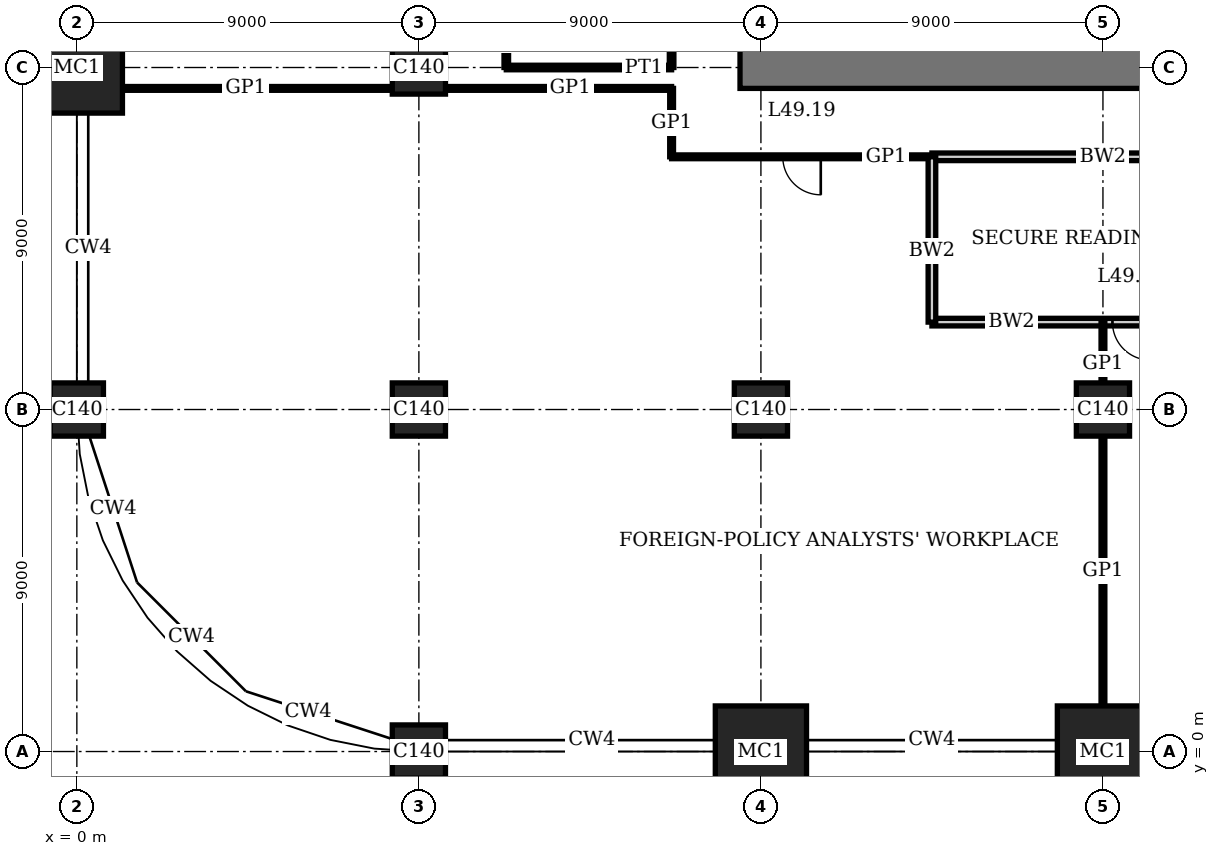
"""IFC4 building model, lengths in metres.
Left out: names, types, materials, properties, quantities, classifications, styles, units other than length and angle.
Written with IfcOpenShell. Run it as: python <this file> out.ifc"""

import sys

from ifc_helpers import new_model, si_unit, direction, frame, frame_2d, origin, origin_2d, place, context, subcontext, project, spatial, rectangle, extrude, element, fill, save


model = new_model("IFC4")
c1 = context("Model", 3, precision=1e-05, world=origin(), true_north=direction((0.0, 1.0)))
c2 = subcontext(c1, "Body", "Model", "MODEL_VIEW")
j1 = project(units=[si_unit("LENGTHUNIT", "METRE"), si_unit("PLANEANGLEUNIT", "RADIAN")], contexts=[c1])
p1 = place(None, origin())
s1 = spatial("IfcSite", under=j1, at=p1, CompositionType="ELEMENT")
p2 = place(p1, origin())
s2 = spatial("IfcBuilding", under=s1, at=p2, CompositionType="ELEMENT")
p3 = place(p2, frame((0.0, 0.0, 202.2)))
s3 = spatial("IfcBuildingStorey", under=s2, at=p3, CompositionType="ELEMENT", Elevation=202.2)
p4 = place(p3, frame((0.0, 9.0, 0.0), z_axis=(0.0, 0.0, 1.0), x_axis=(1.0, 0.0, 0.0)))
e1 = element("IfcColumn", 1, at=p4, inside=s3, PredefinedType="COLUMN", context=c2, shape_type="SweptSolid", body=[
    extrude(rectangle(XDim=1.4, YDim=1.4, at=origin_2d()), origin(), (0.0, 0.0, 1.0), 4.0),
])
p5 = place(p3, frame((0.0, 18.0, 0.0), z_axis=(0.0, 0.0, 1.0), x_axis=(1.0, 0.0, 0.0)))
e2 = element("IfcColumn", 2, at=p5, inside=s3, PredefinedType="COLUMN", context=c2, shape_type="SweptSolid", body=[
    extrude(rectangle(XDim=2.4, YDim=2.4, at=origin_2d()), origin(), (0.0, 0.0, 1.0), 4.0),
])
for number, where, z_axis, x_axis in (
    (3, (9.0, 0.0, 0.0), (0.0, 0.0, 1.0), (1.0, 0.0, 0.0)),
    (4, (9.0, 9.0, 0.0), (0.0, 0.0, 1.0), (1.0, 0.0, 0.0)),
    (5, (9.0, 18.0, 0.0), (0.0, 0.0, 1.0), (1.0, 0.0, 0.0)),
):
    element("IfcColumn", number, at=place(p3, frame(where, z_axis=z_axis, x_axis=x_axis)), inside=s3, PredefinedType="COLUMN", context=c2, shape_type="SweptSolid", body=[
        extrude(rectangle(XDim=1.4, YDim=1.4, at=origin_2d()), origin(), (0.0, 0.0, 1.0), 4.0),
    ])
p6 = place(p3, frame((18.0, 0.0, 0.0), z_axis=(0.0, 0.0, 1.0), x_axis=(1.0, 0.0, 0.0)))
e6 = element("IfcColumn", 6, at=p6, inside=s3, PredefinedType="COLUMN", context=c2, shape_type="SweptSolid", body=[
    extrude(rectangle(XDim=2.4, YDim=2.4, at=origin_2d()), origin(), (0.0, 0.0, 1.0), 4.0),
])
p7 = place(p3, frame((18.0, 9.0, 0.0), z_axis=(0.0, 0.0, 1.0), x_axis=(1.0, 0.0, 0.0)))
e7 = element("IfcColumn", 7, at=p7, inside=s3, PredefinedType="COLUMN", context=c2, shape_type="SweptSolid", body=[
    extrude(rectangle(XDim=1.4, YDim=1.4, at=origin_2d()), origin(), (0.0, 0.0, 1.0), 4.0),
])
p8 = place(p3, frame((27.0, 0.0, 0.0), z_axis=(0.0, 0.0, 1.0), x_axis=(1.0, 0.0, 0.0)))
e8 = element("IfcColumn", 8, at=p8, inside=s3, PredefinedType="COLUMN", context=c2, shape_type="SweptSolid", body=[
    extrude(rectangle(XDim=2.4, YDim=2.4, at=origin_2d()), origin(), (0.0, 0.0, 1.0), 4.0),
])
p9 = place(p3, frame((27.0, 9.0, 0.0), z_axis=(0.0, 0.0, 1.0), x_axis=(1.0, 0.0, 0.0)))
e9 = element("IfcColumn", 9, at=p9, inside=s3, PredefinedType="COLUMN", context=c2, shape_type="SweptSolid", body=[
    extrude(rectangle(XDim=1.4, YDim=1.4, at=origin_2d()), origin(), (0.0, 0.0, 1.0), 4.0),
])
p10 = place(p3, frame((17.45, 18.0, 0.0), z_axis=(0.0, 0.0, 1.0), x_axis=(1.0, 0.0, 0.0)))
e10 = element("IfcWall", 10, at=p10, inside=s3, PredefinedType="SHEAR", context=c2, shape_type="SweptSolid", body=[
    extrude(rectangle(XDim=28.1, YDim=1.1, at=frame_2d((14.05, 0.0))), origin(), (0.0, 0.0, 1.0), 4.0),
])
p11 = place(p10, frame((11.55, 0.0, 0.0)))
e11 = element("IfcOpeningElement", 11, at=p11, cuts=e10, PredefinedType="OPENING", context=c2, shape_type="SweptSolid", body=[
    extrude(rectangle(XDim=1.0, YDim=2.4, at=frame_2d((0.5, 1.2))), frame((0.0, 0.56, 0.0), z_axis=(0.0, -1.0, 0.0), x_axis=(1.0, 0.0, 0.0)), (0.0, 0.0, 1.0), 1.12),
])
p12 = place(p10, frame((16.55, 0.0, 0.0)))
e12 = element("IfcOpeningElement", 12, at=p12, cuts=e10, PredefinedType="OPENING", context=c2, shape_type="SweptSolid", body=[
    extrude(rectangle(XDim=1.0, YDim=2.4, at=frame_2d((0.5, 1.2))), frame((0.0, 0.56, 0.0), z_axis=(0.0, -1.0, 0.0), x_axis=(1.0, 0.0, 0.0)), (0.0, 0.0, 1.0), 1.12),
])
p13 = place(p10, frame((20.0, 0.0, 0.0)))
e13 = element("IfcOpeningElement", 13, at=p13, cuts=e10, PredefinedType="OPENING", context=c2, shape_type="SweptSolid", body=[
    extrude(rectangle(XDim=1.1, YDim=2.4, at=frame_2d((0.55, 1.2))), frame((0.0, 0.56, 0.0), z_axis=(0.0, -1.0, 0.0), x_axis=(1.0, 0.0, 0.0)), (0.0, 0.0, 1.0), 1.12),
])
p14 = place(p10, frame((24.05, 0.0, 0.0)))
e14 = element("IfcOpeningElement", 14, at=p14, cuts=e10, PredefinedType="OPENING", context=c2, shape_type="SweptSolid", body=[
    extrude(rectangle(XDim=1.0, YDim=2.4, at=frame_2d((0.5, 1.2))), frame((0.0, 0.56, 0.0), z_axis=(0.0, -1.0, 0.0), x_axis=(1.0, 0.0, 0.0)), (0.0, 0.0, 1.0), 1.12),
])
p15 = place(p3, frame((22.5, 11.3, 0.0), z_axis=(0.0, 0.0, 1.0), x_axis=(1.0, 0.0, 0.0)))
e15 = element("IfcWall", 15, at=p15, inside=s3, PredefinedType="SOLIDWALL", context=c2, shape_type="SweptSolid", body=[
    extrude(rectangle(XDim=9.0, YDim=0.2, at=frame_2d((4.5, 0.0))), origin(), (0.0, 0.0, 1.0), 3.75),
])
p16 = place(p15, frame((4.75, 0.0, 0.0)))
e16 = element("IfcOpeningElement", 16, at=p16, cuts=e15, PredefinedType="OPENING", context=c2, shape_type="SweptSolid", body=[
    extrude(rectangle(XDim=1.0, YDim=2.4, at=frame_2d((0.5, 1.2))), frame((0.0, 0.11, 0.0), z_axis=(0.0, -1.0, 0.0), x_axis=(1.0, 0.0, 0.0)), (0.0, 0.0, 1.0), 0.22),
])
p17 = place(p3, frame((22.5, 15.65, 0.0), z_axis=(0.0, 0.0, 1.0), x_axis=(1.0, 0.0, 0.0)))
e17 = element("IfcWall", 17, at=p17, inside=s3, PredefinedType="SOLIDWALL", context=c2, shape_type="SweptSolid", body=[
    extrude(rectangle(XDim=9.0, YDim=0.2, at=frame_2d((4.5, 0.0))), origin(), (0.0, 0.0, 1.0), 3.75),
])
p18 = place(p3, frame((15.65, 15.65, 0.0), z_axis=(0.0, 0.0, 1.0), x_axis=(1.0, 0.0, 0.0)))
e18 = element("IfcWall", 18, at=p18, inside=s3, PredefinedType="PARTITIONING", context=c2, shape_type="SweptSolid", body=[
    extrude(rectangle(XDim=6.85, YDim=0.1, at=frame_2d((3.425, 0.0))), origin(), (0.0, 0.0, 1.0), 3.75),
])
p19 = place(p18, frame((2.925, 0.0, 0.0)))
e19 = element("IfcOpeningElement", 19, at=p19, cuts=e18, PredefinedType="OPENING", context=c2, shape_type="SweptSolid", body=[
    extrude(rectangle(XDim=1.0, YDim=2.4, at=frame_2d((0.5, 1.2))), frame((0.0, 0.06, 0.0), z_axis=(0.0, -1.0, 0.0), x_axis=(1.0, 0.0, 0.0)), (0.0, 0.0, 1.0), 0.12),
])
p20 = place(p3, frame((1.2, 17.45, 0.0), z_axis=(0.0, 0.0, 1.0), x_axis=(1.0, 0.0, 0.0)))
e20 = element("IfcWall", 20, at=p20, inside=s3, PredefinedType="PARTITIONING", context=c2, shape_type="SweptSolid", body=[
    extrude(rectangle(XDim=7.1, YDim=0.1, at=frame_2d((3.55, 0.0))), origin(), (0.0, 0.0, 1.0), 3.75),
])
p21 = place(p3, frame((9.7, 17.45, 0.0), z_axis=(0.0, 0.0, 1.0), x_axis=(1.0, 0.0, 0.0)))
e21 = element("IfcWall", 21, at=p21, inside=s3, PredefinedType="PARTITIONING", context=c2, shape_type="SweptSolid", body=[
    extrude(rectangle(XDim=5.95, YDim=0.1, at=frame_2d((2.975, 0.0))), origin(), (0.0, 0.0, 1.0), 3.75),
])
p22 = place(p3, frame((11.3, 18.0, 0.0), z_axis=(0.0, 0.0, 1.0), x_axis=(1.0, 0.0, 0.0)))
e22 = element("IfcWall", 22, at=p22, inside=s3, PredefinedType="PARTITIONING", context=c2, shape_type="SweptSolid", body=[
    extrude(rectangle(XDim=4.35, YDim=0.12, at=frame_2d((2.175, 0.0))), origin(), (0.0, 0.0, 1.0), 3.05),
])
p23 = place(p3, frame((11.3, 18.0, 0.0), z_axis=(0.0, 0.0, 1.0), x_axis=(0.0, 1.0, 0.0)))
e23 = element("IfcWall", 23, at=p23, inside=s3, PredefinedType="PARTITIONING", context=c2, shape_type="SweptSolid", body=[
    extrude(rectangle(XDim=4.5, YDim=0.12, at=frame_2d((2.25, 0.0))), origin(), (0.0, 0.0, 1.0), 3.75),
])
p24 = place(p23, frame((1.75, 0.0, 0.0)))
e24 = element("IfcOpeningElement", 24, at=p24, cuts=e23, PredefinedType="OPENING", context=c2, shape_type="SweptSolid", body=[
    extrude(rectangle(XDim=1.0, YDim=2.4, at=frame_2d((0.5, 1.2))), frame((0.0, 0.07, 0.0), z_axis=(0.0, -1.0, 0.0), x_axis=(1.0, 0.0, 0.0)), (0.0, 0.0, 1.0), 0.14),
])
p25 = place(p3, frame((15.65, 18.0, 0.0), z_axis=(0.0, 0.0, 1.0), x_axis=(0.0, 1.0, 0.0)))
e25 = element("IfcWall", 25, at=p25, inside=s3, PredefinedType="PARTITIONING", context=c2, shape_type="SweptSolid", body=[
    extrude(rectangle(XDim=4.5, YDim=0.12, at=frame_2d((2.25, 0.0))), origin(), (0.0, 0.0, 1.0), 3.75),
])
p26 = place(p3, frame((15.65, 15.65, 0.0), z_axis=(0.0, 0.0, 1.0), x_axis=(0.0, 1.0, 0.0)))
e26 = element("IfcWall", 26, at=p26, inside=s3, PredefinedType="PARTITIONING", context=c2, shape_type="SweptSolid", body=[
    extrude(rectangle(XDim=1.8, YDim=0.1, at=frame_2d((0.9, 0.0))), origin(), (0.0, 0.0, 1.0), 3.75),
])
p27 = place(p3, frame((22.5, 11.3, 0.0), z_axis=(0.0, 0.0, 1.0), x_axis=(0.0, 1.0, 0.0)))
e27 = element("IfcWall", 27, at=p27, inside=s3, PredefinedType="SOLIDWALL", context=c2, shape_type="SweptSolid", body=[
    extrude(rectangle(XDim=4.35, YDim=0.2, at=frame_2d((2.175, 0.0))), origin(), (0.0, 0.0, 1.0), 3.75),
])
p28 = place(p3, frame((27.0, 1.2, 0.0), z_axis=(0.0, 0.0, 1.0), x_axis=(0.0, 1.0, 0.0)))
e28 = element("IfcWall", 28, at=p28, inside=s3, PredefinedType="PARTITIONING", context=c2, shape_type="SweptSolid", body=[
    extrude(rectangle(XDim=7.1, YDim=0.1, at=frame_2d((3.55, 0.0))), origin(), (0.0, 0.0, 1.0), 3.05),
])
p29 = place(p3, frame((27.0, 9.7, 0.0), z_axis=(0.0, 0.0, 1.0), x_axis=(0.0, 1.0, 0.0)))
e29 = element("IfcWall", 29, at=p29, inside=s3, PredefinedType="PARTITIONING", context=c2, shape_type="SweptSolid", body=[
    extrude(rectangle(XDim=1.61, YDim=0.1, at=frame_2d((0.805, 0.0))), origin(), (0.0, 0.0, 1.0), 3.05),
])
p30 = place(p16, origin())
e30 = element("IfcDoor", 30, at=p30, inside=s3, OperationType="SINGLE_SWING_RIGHT", PredefinedType="DOOR", context=c2, shape_type="SweptSolid", body=[
    extrude(rectangle(XDim=1.0, YDim=2.4, at=frame_2d((0.5, 1.2))), frame((0.0, 0.035, 0.0), z_axis=(0.0, -1.0, 0.0), x_axis=(1.0, 0.0, 0.0)), (0.0, 0.0, 1.0), 0.07),
])
fill(e16, e30)
p31 = place(p19, origin())
e31 = element("IfcDoor", 31, at=p31, inside=s3, OperationType="SINGLE_SWING_RIGHT", PredefinedType="DOOR", context=c2, shape_type="SweptSolid", body=[
    extrude(rectangle(XDim=1.0, YDim=2.4, at=frame_2d((0.5, 1.2))), frame((0.0, 0.02, 0.0), z_axis=(0.0, -1.0, 0.0), x_axis=(1.0, 0.0, 0.0)), (0.0, 0.0, 1.0), 0.04),
])
fill(e19, e31)
save(model, sys.argv[1])
